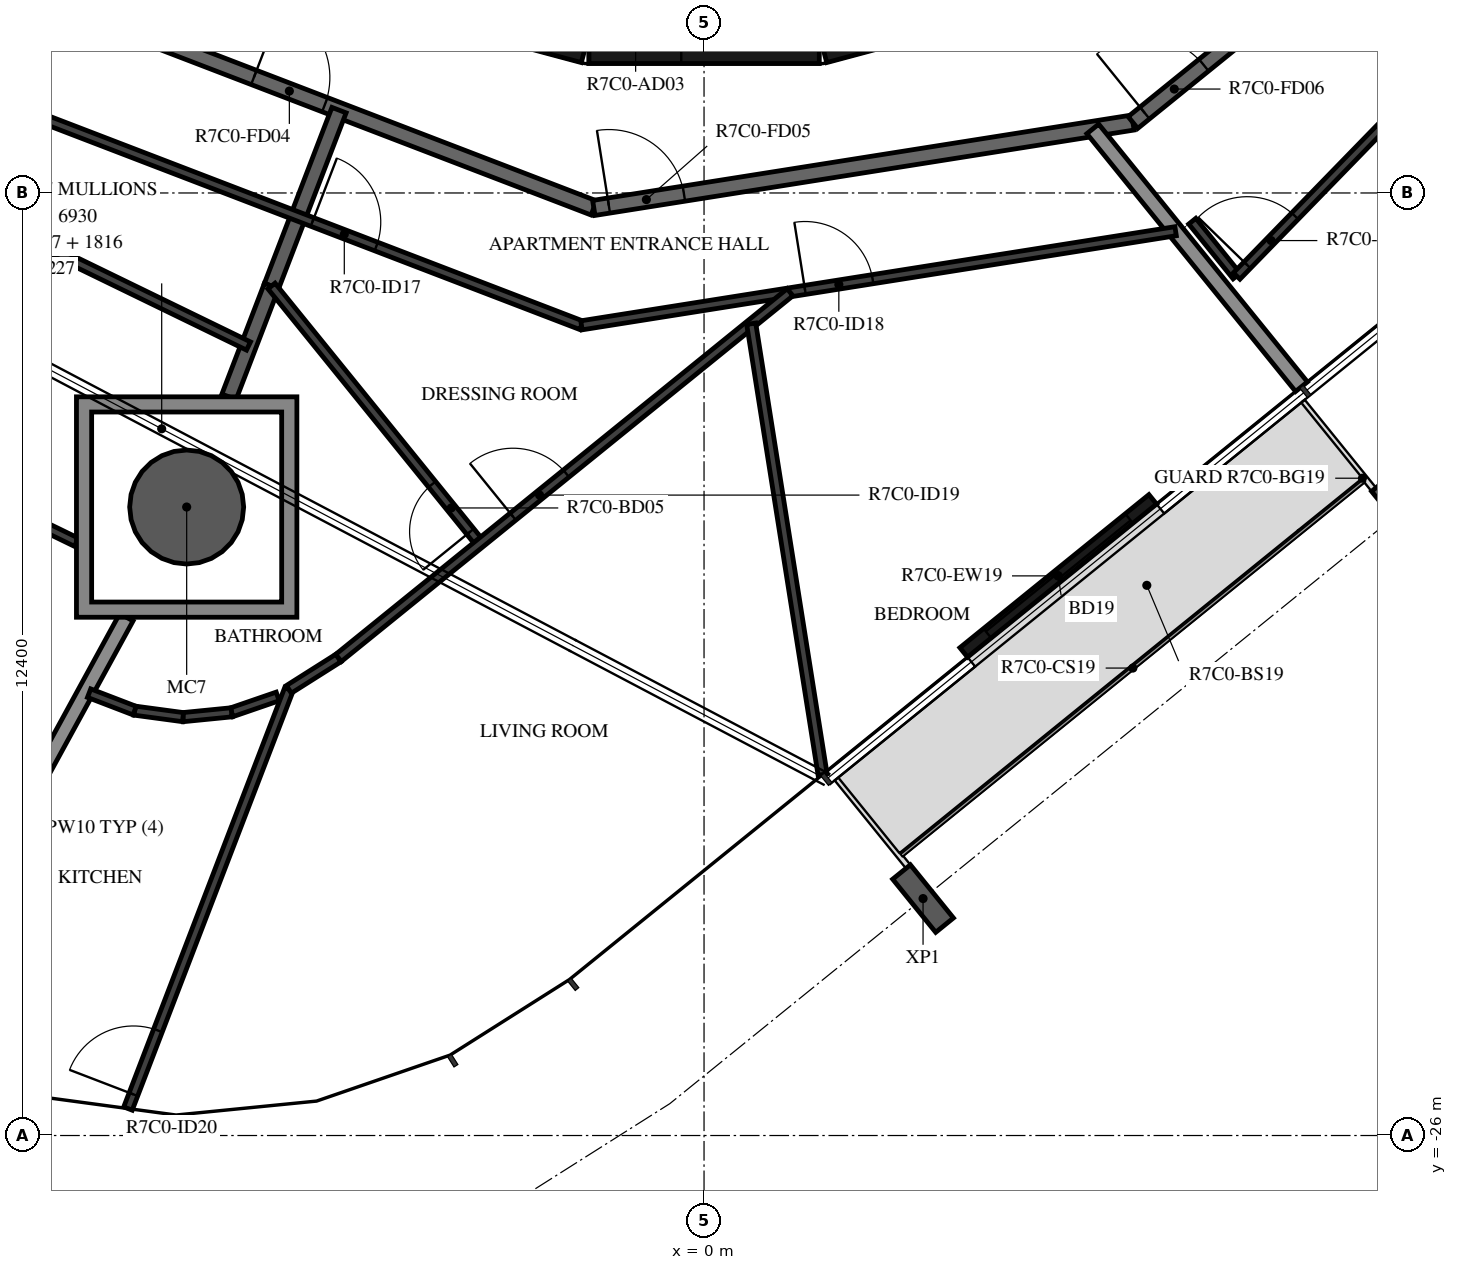
"""IFC4 building model, lengths in metres.
Left out: names, types, materials, properties, quantities, classifications, styles, units other than length and angle.
Written with IfcOpenShell. Run it as: python <this file> out.ifc"""

import sys

from ifc_helpers import new_model, si_unit, direction, frame, frame_2d, origin, origin_2d, place, context, subcontext, project, spatial, polyline, rectangle, hollow_circle, i_section, outline, extrude, element, fill, save


model = new_model("IFC4")
c1 = context("Model", 3, precision=1e-05, world=origin(), true_north=direction((0.0, 1.0)))
c2 = subcontext(c1, "Body", "Model", "MODEL_VIEW")
j1 = project(units=[si_unit("LENGTHUNIT", "METRE"), si_unit("PLANEANGLEUNIT", "RADIAN")], contexts=[c1])
p1 = place(None, origin())
s1 = spatial("IfcSite", under=j1, at=p1, CompositionType="ELEMENT")
p2 = place(p1, origin())
s2 = spatial("IfcBuilding", under=s1, at=p2, CompositionType="ELEMENT")
p3 = place(p2, frame((0.0, 0.0, 284.4)))
s3 = spatial("IfcBuildingStorey", under=s2, at=p3, CompositionType="ELEMENT", Elevation=284.4)
p4 = place(p3, frame((-6.807, -17.732, -0.38), z_axis=(0.0, 0.0, 1.0), x_axis=(1.0, 0.0, 0.0)))
e1 = element("IfcColumn", 1, at=p4, inside=s3, PredefinedType="COLUMN", context=c2, shape_type="SweptSolid", body=[
    extrude(hollow_circle(Radius=0.75, WallThickness=0.035, at=origin_2d()), origin(), (0.0, 0.0, 1.0), 3.5),
])
for number, where, z_axis, x_axis in (
    (2, (2.881, -22.883, -0.38), (0.0, 0.0, 1.0), (-0.777, -0.629, 0.0)),
    (3, (9.182, -17.781, -0.38), (0.0, 0.0, 1.0), (-0.777, -0.629, 0.0)),
):
    element("IfcColumn", number, at=place(p3, frame(where, z_axis=z_axis, x_axis=x_axis)), inside=s3, PredefinedType="COLUMN", context=c2, shape_type="SweptSolid", body=[
        extrude(i_section(OverallWidth=0.3, OverallDepth=0.9, WebThickness=0.019, FlangeThickness=0.035, FilletRadius=0.03, at=origin_2d()), origin(), (0.0, 0.0, 1.0), 3.5),
    ])
p5 = place(p3, frame((3.417, -19.645, 0.0), z_axis=(0.0, 0.0, 1.0), x_axis=(0.777125818, 0.629345265333, 0.0)))
e4 = element("IfcWall", 4, at=p5, inside=s3, PredefinedType="STANDARD", context=c2, shape_type="SweptSolid", body=[
    extrude(rectangle(XDim=3.2, YDim=0.16, at=frame_2d((1.6, 0.0))), origin(), (0.0, 0.0, 1.0), 3.12),
])
p6 = place(p5, frame((0.4, 0.0, 0.0)))
e5 = element("IfcOpeningElement", 5, at=p6, cuts=e4, PredefinedType="OPENING", context=c2, shape_type="SweptSolid", body=[
    extrude(rectangle(XDim=2.4, YDim=2.4, at=frame_2d((1.2, 1.2))), frame((0.0, 0.09, 0.0), z_axis=(0.0, -1.0, 0.0), x_axis=(1.0, 0.0, 0.0)), (0.0, 0.0, 1.0), 0.18),
])
for number, where, z_axis, x_axis in (
    (6, (1.55, -11.643, 0.0), (0.0, 0.0, 1.0), (0.966, 0.259, 0.0)),
    (7, (-4.479, -10.858, 0.0), (0.0, 0.0, 1.0), (0.966, -0.259, 0.0)),
):
    element("IfcWall", number, at=place(p3, frame(where, z_axis=z_axis, x_axis=x_axis)), inside=s3, PredefinedType="SHEAR", context=c2, shape_type="SweptSolid", body=[
        extrude(rectangle(XDim=3.033, YDim=0.5, at=frame_2d((1.516, 0.0))), origin(), (0.0, 0.0, 1.0), 3.12),
    ])
p7 = place(p3, frame((-1.516, -11.647, 0.0), z_axis=(0.0, 0.0, 1.0), x_axis=(1.0, 0.0, 0.0)))
e8 = element("IfcWall", 8, at=p7, inside=s3, PredefinedType="SHEAR", context=c2, shape_type="SweptSolid", body=[
    extrude(rectangle(XDim=3.033, YDim=0.5, at=frame_2d((1.516, 0.0))), origin(), (0.0, 0.0, 1.0), 3.12),
])
p8 = place(p7, frame((0.016, 0.0, 0.0)))
e9 = element("IfcOpeningElement", 9, at=p8, cuts=e8, PredefinedType="OPENING", context=c2, shape_type="SweptSolid", body=[
    extrude(rectangle(XDim=1.2, YDim=2.1, at=frame_2d((0.6, 1.05))), frame((0.0, 0.26, 0.0), z_axis=(0.0, -1.0, 0.0), x_axis=(1.0, 0.0, 0.0)), (0.0, 0.0, 1.0), 0.52),
])
p9 = place(p3, frame((-8.154, -11.223, 0.0), z_axis=(0.0, 0.0, 1.0), x_axis=(0.93359073609, -0.358341090983, 0.0)))
e10 = element("IfcWall", 10, at=p9, inside=s3, PredefinedType="STANDARD", context=c2, shape_type="SweptSolid", body=[
    extrude(rectangle(XDim=7.181, YDim=0.2, at=frame_2d((3.59, 0.0))), origin(), (0.0, 0.0, 1.0), 3.12),
])
p10 = place(p9, frame((2.39, 0.0, 0.0)))
e11 = element("IfcOpeningElement", 11, at=p10, cuts=e10, PredefinedType="OPENING", context=c2, shape_type="SweptSolid", body=[
    extrude(rectangle(XDim=1.0, YDim=2.1, at=frame_2d((0.5, 1.05))), frame((0.0, 0.11, 0.0), z_axis=(0.0, -1.0, 0.0), x_axis=(1.0, 0.0, 0.0)), (0.0, 0.0, 1.0), 0.22),
])
p11 = place(p3, frame((-1.45, -13.797, 0.0), z_axis=(0.0, 0.0, 1.0), x_axis=(0.987690361611, 0.156421704315, 0.0)))
e12 = element("IfcWall", 12, at=p11, inside=s3, PredefinedType="STANDARD", context=c2, shape_type="SweptSolid", body=[
    extrude(rectangle(XDim=7.181, YDim=0.2, at=frame_2d((3.591, 0.0))), origin(), (0.0, 0.0, 1.0), 3.12),
])
p12 = place(p11, frame((0.2, 0.0, 0.0)))
e13 = element("IfcOpeningElement", 13, at=p12, cuts=e12, PredefinedType="OPENING", context=c2, shape_type="SweptSolid", body=[
    extrude(rectangle(XDim=1.0, YDim=2.1, at=frame_2d((0.5, 1.05))), frame((0.0, 0.11, 0.0), z_axis=(0.0, -1.0, 0.0), x_axis=(1.0, 0.0, 0.0)), (0.0, 0.0, 1.0), 0.22),
])
p13 = place(p3, frame((5.643, -12.673, 0.0), z_axis=(0.0, 0.0, 1.0), x_axis=(0.777160148113, 0.629302871585, 0.0)))
e14 = element("IfcWall", 14, at=p13, inside=s3, PredefinedType="STANDARD", context=c2, shape_type="SweptSolid", body=[
    extrude(rectangle(XDim=7.181, YDim=0.2, at=frame_2d((3.59, 0.0))), origin(), (0.0, 0.0, 1.0), 3.12),
])
p14 = place(p13, frame((0.2, 0.0, 0.0)))
e15 = element("IfcOpeningElement", 15, at=p14, cuts=e14, PredefinedType="OPENING", context=c2, shape_type="SweptSolid", body=[
    extrude(rectangle(XDim=1.0, YDim=2.1, at=frame_2d((0.5, 1.05))), frame((0.0, 0.11, 0.0), z_axis=(0.0, -1.0, 0.0), x_axis=(1.0, 0.0, 0.0)), (0.0, 0.0, 1.0), 0.22),
])
p15 = place(p3, frame((-5.69, -14.824, 0.0), z_axis=(0.0, 0.0, 1.0), x_axis=(0.358345342952, 0.933589104041, 0.0)))
e16 = element("IfcWall", 16, at=p15, inside=s3, PredefinedType="STANDARD", context=c2, shape_type="SweptSolid", body=[
    extrude(rectangle(XDim=2.479, YDim=0.2, at=frame_2d((1.239, 0.0))), origin(), (0.0, 0.0, 1.0), 3.12),
])
p16 = place(p3, frame((-6.25, -16.282, 0.0), z_axis=(0.0, 0.0, 1.0), x_axis=(0.358360842469, 0.933583154617, 0.0)))
e17 = element("IfcWall", 17, at=p16, inside=s3, PredefinedType="STANDARD", context=c2, shape_type="SweptSolid", body=[
    extrude(rectangle(XDim=1.562, YDim=0.2, at=frame_2d((0.781, 0.0))), origin(), (0.0, 0.0, 1.0), 3.12),
])
p17 = place(p3, frame((-10.637, -24.738, 0.0), z_axis=(0.0, 0.0, 1.0), x_axis=(0.479683887596, 0.877441375808, 0.0)))
e18 = element("IfcWall", 18, at=p17, inside=s3, PredefinedType="STANDARD", context=c2, shape_type="SweptSolid", body=[
    extrude(rectangle(XDim=6.333, YDim=0.2, at=frame_2d((3.166, 0.0))), origin(), (0.0, 0.0, 1.0), 2.73),
])
p18 = place(p3, frame((7.861, -16.148, 0.0), z_axis=(0.0, 0.0, 1.0), x_axis=(-0.629330189513, 0.777138026716, 0.0)))
e19 = element("IfcWall", 19, at=p18, inside=s3, PredefinedType="STANDARD", context=c2, shape_type="SweptSolid", body=[
    extrude(rectangle(XDim=4.364, YDim=0.2, at=frame_2d((2.182, 0.0))), origin(), (0.0, 0.0, 1.0), 2.73),
])
p19 = place(p3, frame((-9.067, -12.479, 0.0), z_axis=(0.0, 0.0, 1.0), x_axis=(0.933579449035, -0.358370495911, 0.0)))
e20 = element("IfcWall", 20, at=p19, inside=s3, PredefinedType="PARTITIONING", context=c2, shape_type="SweptSolid", body=[
    extrude(rectangle(XDim=7.985, YDim=0.12, at=frame_2d((3.992, 0.0))), origin(), (0.0, 0.0, 1.0), 3.12),
])
p20 = place(p19, frame((4.192, 0.0, 0.0)))
e21 = element("IfcOpeningElement", 21, at=p20, cuts=e20, PredefinedType="OPENING", context=c2, shape_type="SweptSolid", body=[
    extrude(rectangle(XDim=0.9, YDim=2.1, at=frame_2d((0.45, 1.05))), frame((0.0, 0.07, 0.0), z_axis=(0.0, -1.0, 0.0), x_axis=(1.0, 0.0, 0.0)), (0.0, 0.0, 1.0), 0.14),
])
p21 = place(p3, frame((-12.064, -12.662, 0.0), z_axis=(0.0, 0.0, 1.0), x_axis=(0.899383852228, -0.437159794985, 0.0)))
e22 = element("IfcWall", 22, at=p21, inside=s3, PredefinedType="PARTITIONING", context=c2, shape_type="SweptSolid", body=[
    extrude(rectangle(XDim=6.75, YDim=0.12, at=frame_2d((3.375, 0.0))), origin(), (0.0, 0.0, 1.0), 3.12),
])
p22 = place(p21, frame((0.5, 0.0, 0.0)))
e23 = element("IfcOpeningElement", 23, at=p22, cuts=e22, PredefinedType="OPENING", context=c2, shape_type="SweptSolid", body=[
    extrude(rectangle(XDim=0.9, YDim=2.1, at=frame_2d((0.45, 1.05))), frame((0.0, 0.07, 0.0), z_axis=(0.0, -1.0, 0.0), x_axis=(1.0, 0.0, 0.0)), (0.0, 0.0, 1.0), 0.14),
])
p23 = place(p3, frame((-11.433, -16.651, 0.0), z_axis=(0.0, 0.0, 1.0), x_axis=(0.899390128806, -0.437146881731, 0.0)))
e24 = element("IfcWall", 24, at=p23, inside=s3, PredefinedType="PARTITIONING", context=c2, shape_type="SweptSolid", body=[
    extrude(rectangle(XDim=3.531, YDim=0.12, at=frame_2d((1.766, 0.0))), origin(), (0.0, 0.0, 1.0), 3.12),
])
p24 = place(p23, frame((0.5, 0.0, 0.0)))
e25 = element("IfcOpeningElement", 25, at=p24, cuts=e24, PredefinedType="OPENING", context=c2, shape_type="SweptSolid", body=[
    extrude(rectangle(XDim=0.8, YDim=2.1, at=frame_2d((0.4, 1.05))), frame((0.0, 0.07, 0.0), z_axis=(0.0, -1.0, 0.0), x_axis=(1.0, 0.0, 0.0)), (0.0, 0.0, 1.0), 0.14),
])
p25 = place(p3, frame((-1.612, -15.341, 0.0), z_axis=(0.0, 0.0, 1.0), x_axis=(0.987687560018, 0.15643939333, 0.0)))
e26 = element("IfcWall", 26, at=p25, inside=s3, PredefinedType="PARTITIONING", context=c2, shape_type="SweptSolid", body=[
    extrude(rectangle(XDim=7.914, YDim=0.12, at=frame_2d((3.957, 0.0))), origin(), (0.0, 0.0, 1.0), 3.12),
])
p26 = place(p25, frame((2.978, 0.0, 0.0)))
e27 = element("IfcOpeningElement", 27, at=p26, cuts=e26, PredefinedType="OPENING", context=c2, shape_type="SweptSolid", body=[
    extrude(rectangle(XDim=0.9, YDim=2.1, at=frame_2d((0.45, 1.05))), frame((0.0, 0.07, 0.0), z_axis=(0.0, -1.0, 0.0), x_axis=(1.0, 0.0, 0.0)), (0.0, 0.0, 1.0), 0.14),
])
p27 = place(p3, frame((-5.609, -20.223, 0.0), z_axis=(0.0, 0.0, 1.0), x_axis=(-0.945401267449, -0.325908642882, 0.0)))
e28 = element("IfcWall", 28, at=p27, inside=s3, PredefinedType="PARTITIONING", context=c2, shape_type="SweptSolid", body=[
    extrude(rectangle(XDim=0.642, YDim=0.12, at=frame_2d((0.321, 0.0))), origin(), (0.0, 0.0, 1.0), 3.12),
])
for number, where, z_axis, x_axis in (
    (29, (-6.216, -20.433, 0.0), (0.0, 0.0, 1.0), (-0.995, -0.099, 0.0)),
    (30, (-6.855, -20.496, 0.0), (0.0, 0.0, 1.0), (-0.991, 0.133, 0.0)),
    (31, (-7.491, -20.41, 0.0), (0.0, 0.0, 1.0), (-0.933, 0.359, 0.0)),
):
    element("IfcWall", number, at=place(p3, frame(where, z_axis=z_axis, x_axis=x_axis)), inside=s3, PredefinedType="PARTITIONING", context=c2, shape_type="SweptSolid", body=[
        extrude(rectangle(XDim=0.642, YDim=0.12, at=frame_2d((0.321, 0.0))), origin(), (0.0, 0.0, 1.0), 3.12),
    ])
p28 = place(p3, frame((-7.579, -25.646, 0.0), z_axis=(0.0, 0.0, 1.0), x_axis=(0.358336526264, 0.933592488158, 0.0)))
e32 = element("IfcWall", 32, at=p28, inside=s3, PredefinedType="PARTITIONING", context=c2, shape_type="SweptSolid", body=[
    extrude(rectangle(XDim=5.908, YDim=0.12, at=frame_2d((2.954, 0.0))), origin(), (0.0, 0.0, 1.0), 3.12),
])
p29 = place(p28, frame((0.2, 0.0, 0.0)))
e33 = element("IfcOpeningElement", 33, at=p29, cuts=e32, PredefinedType="OPENING", context=c2, shape_type="SweptSolid", body=[
    extrude(rectangle(XDim=0.9, YDim=2.1, at=frame_2d((0.45, 1.05))), frame((0.0, 0.07, 0.0), z_axis=(0.0, -1.0, 0.0), x_axis=(1.0, 0.0, 0.0)), (0.0, 0.0, 1.0), 0.14),
])
p30 = place(p3, frame((-2.948, -18.21, 0.0), z_axis=(0.0, 0.0, 1.0), x_axis=(-0.629330389268, 0.777137864953, 0.0)))
e34 = element("IfcWall", 34, at=p30, inside=s3, PredefinedType="PARTITIONING", context=c2, shape_type="SweptSolid", body=[
    extrude(rectangle(XDim=4.357, YDim=0.12, at=frame_2d((2.179, 0.0))), origin(), (0.0, 0.0, 1.0), 3.12),
])
p31 = place(p30, frame((0.2, 0.0, 0.0)))
e35 = element("IfcOpeningElement", 35, at=p31, cuts=e34, PredefinedType="OPENING", context=c2, shape_type="SweptSolid", body=[
    extrude(rectangle(XDim=0.8, YDim=2.1, at=frame_2d((0.4, 1.05))), frame((0.0, 0.07, 0.0), z_axis=(0.0, -1.0, 0.0), x_axis=(1.0, 0.0, 0.0)), (0.0, 0.0, 1.0), 0.14),
])
p32 = place(p3, frame((-5.462, -20.13, 0.0), z_axis=(0.0, 0.0, 1.0), x_axis=(0.84494764883, 0.534849016768, 0.0)))
e36 = element("IfcWall", 36, at=p32, inside=s3, PredefinedType="PARTITIONING", context=c2, shape_type="SweptSolid", body=[
    extrude(rectangle(XDim=0.772, YDim=0.12, at=frame_2d((0.386, 0.0))), origin(), (0.0, 0.0, 1.0), 3.12),
])
p33 = place(p3, frame((-4.809, -19.717, 0.0), z_axis=(0.0, 0.0, 1.0), x_axis=(0.777140730041, 0.629326851255, 0.0)))
e37 = element("IfcWall", 37, at=p33, inside=s3, PredefinedType="PARTITIONING", context=c2, shape_type="SweptSolid", body=[
    extrude(rectangle(XDim=7.644, YDim=0.12, at=frame_2d((3.822, 0.0))), origin(), (0.0, 0.0, 1.0), 3.12),
])
p34 = place(p33, frame((2.954, 0.0, 0.0)))
e38 = element("IfcOpeningElement", 38, at=p34, cuts=e37, PredefinedType="OPENING", context=c2, shape_type="SweptSolid", body=[
    extrude(rectangle(XDim=0.9, YDim=2.1, at=frame_2d((0.45, 1.05))), frame((0.0, 0.07, 0.0), z_axis=(0.0, -1.0, 0.0), x_axis=(1.0, 0.0, 0.0)), (0.0, 0.0, 1.0), 0.14),
])
p35 = place(p3, frame((1.56, -21.251, 0.0), z_axis=(0.0, 0.0, 1.0), x_axis=(-0.156421913213, 0.987690328528, 0.0)))
e39 = element("IfcWall", 39, at=p35, inside=s3, PredefinedType="PARTITIONING", context=c2, shape_type="SweptSolid", body=[
    extrude(rectangle(XDim=6.004, YDim=0.12, at=frame_2d((3.002, 0.0))), origin(), (0.0, 0.0, 1.0), 3.12),
])
p36 = place(p3, frame((6.424, -13.971, 0.0), z_axis=(0.0, 0.0, 1.0), x_axis=(0.629273936268, -0.777183577499, 0.0)))
e40 = element("IfcWall", 40, at=p36, inside=s3, PredefinedType="PARTITIONING", context=c2, shape_type="SweptSolid", body=[
    extrude(rectangle(XDim=0.928, YDim=0.12, at=frame_2d((0.464, 0.0))), origin(), (0.0, 0.0, 1.0), 3.12),
])
p37 = place(p3, frame((7.007, -14.692, 0.0), z_axis=(0.0, 0.0, 1.0), x_axis=(0.697286714348, 0.716792325568, 0.0)))
e41 = element("IfcWall", 41, at=p37, inside=s3, PredefinedType="PARTITIONING", context=c2, shape_type="SweptSolid", body=[
    extrude(rectangle(XDim=7.848, YDim=0.12, at=frame_2d((3.924, 0.0))), origin(), (0.0, 0.0, 1.0), 3.12),
])
p38 = place(p37, frame((0.2, 0.0, 0.0)))
e42 = element("IfcOpeningElement", 42, at=p38, cuts=e41, PredefinedType="OPENING", context=c2, shape_type="SweptSolid", body=[
    extrude(rectangle(XDim=0.9, YDim=2.1, at=frame_2d((0.45, 1.05))), frame((0.0, 0.07, 0.0), z_axis=(0.0, -1.0, 0.0), x_axis=(1.0, 0.0, 0.0)), (0.0, 0.0, 1.0), 0.14),
])
p39 = place(p3, origin())
e43 = element("IfcWall", 43, at=p39, inside=s3, PredefinedType="STANDARD", context=c2, shape_type="SweptSolid", body=[
    extrude(outline(polyline([(-5.357, -16.282), (-5.357, -19.182), (-8.257, -19.182), (-8.257, -16.282), (-5.357, -16.282)]), holes=[polyline([(-8.057, -18.982), (-5.557, -18.982), (-5.557, -16.482), (-8.057, -16.482), (-8.057, -18.982)])]), origin(), (0.0, 0.0, 1.0), 3.12),
])
p40 = place(p6, origin())
e44 = element("IfcDoor", 44, at=p40, inside=s3, OperationType="DOUBLE_DOOR_SLIDING", PredefinedType="DOOR", context=c2, shape_type="SweptSolid", body=[
    extrude(rectangle(XDim=2.4, YDim=2.4, at=frame_2d((1.2, 1.2))), frame((0.0, 0.025, 0.0), z_axis=(0.0, -1.0, 0.0), x_axis=(1.0, 0.0, 0.0)), (0.0, 0.0, 1.0), 0.05),
])
fill(e5, e44)
p41 = place(p10, origin())
e45 = element("IfcDoor", 45, at=p41, inside=s3, OperationType="SINGLE_SWING_RIGHT", PredefinedType="DOOR", context=c2, shape_type="SweptSolid", body=[
    extrude(rectangle(XDim=1.0, YDim=2.1, at=frame_2d((0.5, 1.05))), frame((0.0, 0.025, 0.0), z_axis=(0.0, -1.0, 0.0), x_axis=(1.0, 0.0, 0.0)), (0.0, 0.0, 1.0), 0.05),
])
fill(e11, e45)
p42 = place(p12, origin())
e46 = element("IfcDoor", 46, at=p42, inside=s3, OperationType="SINGLE_SWING_LEFT", PredefinedType="DOOR", context=c2, shape_type="SweptSolid", body=[
    extrude(rectangle(XDim=1.0, YDim=2.1, at=frame_2d((0.5, 1.05))), frame((0.0, 0.025, 0.0), z_axis=(0.0, -1.0, 0.0), x_axis=(1.0, 0.0, 0.0)), (0.0, 0.0, 1.0), 0.05),
])
fill(e13, e46)
p43 = place(p20, origin())
e47 = element("IfcDoor", 47, at=p43, inside=s3, OperationType="SINGLE_SWING_RIGHT", PredefinedType="DOOR", context=c2, shape_type="SweptSolid", body=[
    extrude(rectangle(XDim=0.9, YDim=2.1, at=frame_2d((0.45, 1.05))), frame((0.0, 0.025, 0.0), z_axis=(0.0, -1.0, 0.0), x_axis=(1.0, 0.0, 0.0)), (0.0, 0.0, 1.0), 0.05),
])
fill(e21, e47)
p44 = place(p26, origin())
e48 = element("IfcDoor", 48, at=p44, inside=s3, OperationType="SINGLE_SWING_LEFT", PredefinedType="DOOR", context=c2, shape_type="SweptSolid", body=[
    extrude(rectangle(XDim=0.9, YDim=2.1, at=frame_2d((0.45, 1.05))), frame((0.0, 0.025, 0.0), z_axis=(0.0, -1.0, 0.0), x_axis=(1.0, 0.0, 0.0)), (0.0, 0.0, 1.0), 0.05),
])
fill(e27, e48)
p45 = place(p31, origin())
e49 = element("IfcDoor", 49, at=p45, inside=s3, OperationType="SINGLE_SWING_LEFT", PredefinedType="DOOR", context=c2, shape_type="SweptSolid", body=[
    extrude(rectangle(XDim=0.8, YDim=2.1, at=frame_2d((0.4, 1.05))), frame((0.0, 0.025, 0.0), z_axis=(0.0, -1.0, 0.0), x_axis=(1.0, 0.0, 0.0)), (0.0, 0.0, 1.0), 0.05),
])
fill(e35, e49)
p46 = place(p34, origin())
e50 = element("IfcDoor", 50, at=p46, inside=s3, OperationType="SINGLE_SWING_LEFT", PredefinedType="DOOR", context=c2, shape_type="SweptSolid", body=[
    extrude(rectangle(XDim=0.9, YDim=2.1, at=frame_2d((0.45, 1.05))), frame((0.0, 0.025, 0.0), z_axis=(0.0, -1.0, 0.0), x_axis=(1.0, 0.0, 0.0)), (0.0, 0.0, 1.0), 0.05),
])
fill(e38, e50)
p47 = place(p29, origin())
e51 = element("IfcDoor", 51, at=p47, inside=s3, OperationType="SINGLE_SWING_LEFT", PredefinedType="DOOR", context=c2, shape_type="SweptSolid", body=[
    extrude(rectangle(XDim=0.9, YDim=2.1, at=frame_2d((0.45, 1.05))), frame((0.0, 0.025, 0.0), z_axis=(0.0, -1.0, 0.0), x_axis=(1.0, 0.0, 0.0)), (0.0, 0.0, 1.0), 0.05),
])
fill(e33, e51)
p48 = place(p14, origin())
e52 = element("IfcDoor", 52, at=p48, inside=s3, OperationType="SINGLE_SWING_LEFT", PredefinedType="DOOR", context=c2, shape_type="SweptSolid", body=[
    extrude(rectangle(XDim=1.0, YDim=2.1, at=frame_2d((0.5, 1.05))), frame((0.0, 0.025, 0.0), z_axis=(0.0, -1.0, 0.0), x_axis=(1.0, 0.0, 0.0)), (0.0, 0.0, 1.0), 0.05),
])
fill(e15, e52)
p49 = place(p38, origin())
e53 = element("IfcDoor", 53, at=p49, inside=s3, OperationType="SINGLE_SWING_LEFT", PredefinedType="DOOR", context=c2, shape_type="SweptSolid", body=[
    extrude(rectangle(XDim=0.9, YDim=2.1, at=frame_2d((0.45, 1.05))), frame((0.0, 0.025, 0.0), z_axis=(0.0, -1.0, 0.0), x_axis=(1.0, 0.0, 0.0)), (0.0, 0.0, 1.0), 0.05),
])
fill(e42, e53)
save(model, sys.argv[1])
